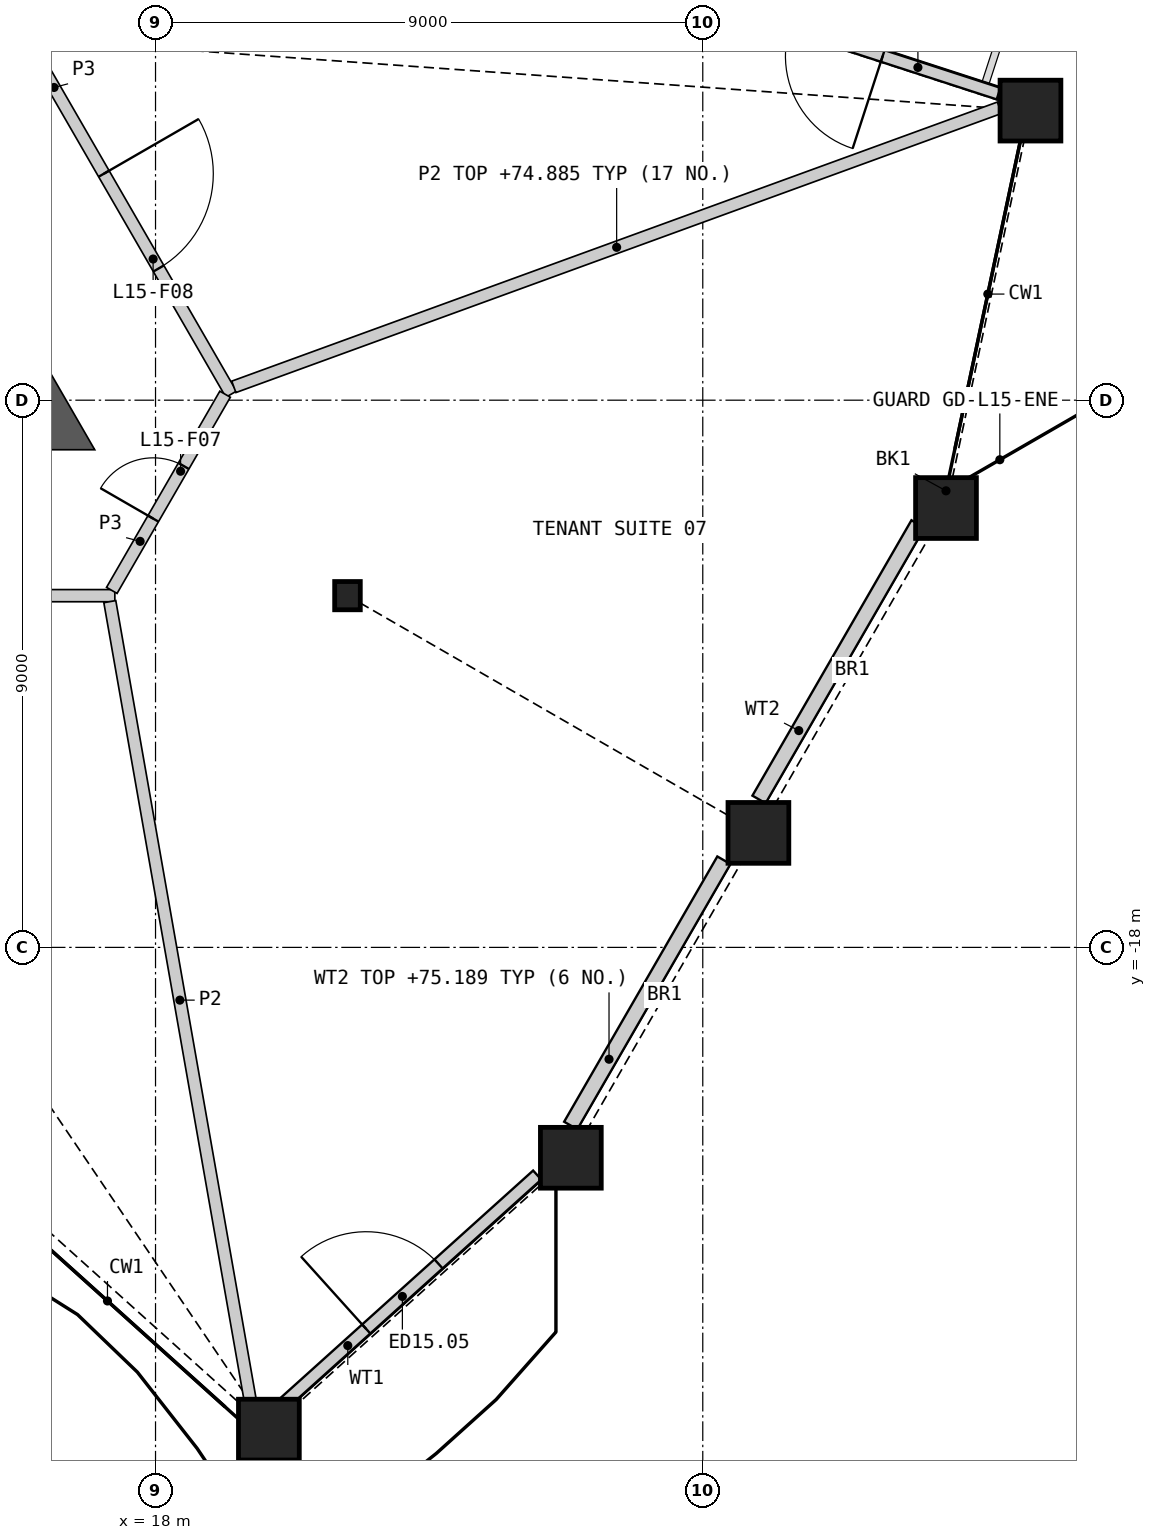
"""IFC4 building model, lengths in metres.
Left out: names, types, materials, properties, quantities, classifications, styles, units other than length and angle.
Written with IfcOpenShell. Run it as: python <this file> out.ifc"""

import sys

from ifc_helpers import new_model, si_unit, direction, frame, frame_2d, origin, origin_2d, place, context, subcontext, project, spatial, polyline, rectangle, hollow_rectangle, i_section, outline, extrude, element, fill, save


model = new_model("IFC4")
c1 = context("Model", 3, precision=1e-05, world=origin(), true_north=direction((0.0, 1.0)))
c2 = subcontext(c1, "Body", "Model", "MODEL_VIEW")
j1 = project(units=[si_unit("LENGTHUNIT", "METRE"), si_unit("PLANEANGLEUNIT", "RADIAN")], contexts=[c1])
p1 = place(None, origin())
s1 = spatial("IfcSite", under=j1, at=p1, CompositionType="ELEMENT")
p2 = place(p1, origin())
s2 = spatial("IfcBuilding", under=s1, at=p2, CompositionType="ELEMENT")
p3 = place(p2, frame((0.0, 0.0, 72.0)))
s3 = spatial("IfcBuildingStorey", under=s2, at=p3, CompositionType="ELEMENT", Elevation=72.0)
for number, where, z_axis, x_axis in (
    (1, (19.864, -25.931, 0.0), (0.0, 0.0, 1.0), (1.0, 0.0, 0.0)),
    (2, (24.83, -21.46, 0.0), (0.0, 0.0, 1.0), (1.0, 0.0, 0.0)),
    (3, (27.915, -16.117, 0.0), (0.0, 0.0, 1.0), (1.0, 0.0, 0.0)),
    (4, (31.0, -10.774, 0.0), (0.0, 0.0, 1.0), (1.0, 0.0, 0.0)),
    (5, (32.389, -4.237, 0.0), (0.0, 0.0, 1.0), (1.0, 0.0, 0.0)),
):
    element("IfcColumn", number, at=place(p3, frame(where, z_axis=z_axis, x_axis=x_axis)), inside=s3, PredefinedType="COLUMN", context=c2, shape_type="SweptSolid", body=[
        extrude(hollow_rectangle(XDim=1.0, YDim=1.0, WallThickness=0.07, at=origin_2d()), origin(), (0.0, 0.0, 1.0), 4.2),
    ])
p4 = place(p3, frame((21.157, -12.215, 0.0), z_axis=(0.0, 0.0, 1.0), x_axis=(1.0, 0.0, 0.0)))
e6 = element("IfcColumn", 6, at=p4, inside=s3, PredefinedType="COLUMN", context=c2, shape_type="SweptSolid", body=[
    extrude(i_section(OverallWidth=0.421, OverallDepth=0.465, WebThickness=0.045, FlangeThickness=0.072, at=origin_2d()), origin(), (0.0, 0.0, 1.0), 4.2),
])
p5 = place(p3, frame((20.124, -25.484, 0.0), z_axis=(0.0, 0.0, 1.0), x_axis=(0.74315945765, 0.669114355327, 0.0)))
e7 = element("IfcWall", 7, at=p5, inside=s3, PredefinedType="SOLIDWALL", context=c2, shape_type="SweptSolid", body=[
    extrude(rectangle(XDim=5.589, YDim=0.2, at=frame_2d((2.794, 0.0))), origin(), (0.0, 0.0, 1.0), 3.189),
])
p6 = place(p5, frame((1.805, 0.0, 0.0)))
e8 = element("IfcOpeningElement", 8, at=p6, cuts=e7, PredefinedType="OPENING", context=c2, shape_type="SweptSolid", body=[
    extrude(rectangle(XDim=1.6, YDim=2.4, at=frame_2d((0.8, 1.2))), frame((0.0, 0.11, 0.0), z_axis=(0.0, -1.0, 0.0), x_axis=(1.0, 0.0, 0.0)), (0.0, 0.0, 1.0), 0.22),
])
p7 = place(p3, frame((24.828, -20.93, 0.0), z_axis=(0.0, 0.0, 1.0), x_axis=(0.500021659459, 0.866012898329, 0.0)))
e9 = element("IfcWall", 9, at=p7, inside=s3, PredefinedType="SOLIDWALL", context=c2, shape_type="SweptSolid", body=[
    extrude(rectangle(XDim=5.038, YDim=0.25, at=frame_2d((2.519, 0.0))), origin(), (0.0, 0.0, 1.0), 3.189),
])
p8 = place(p3, frame((27.925, -15.567, 0.0), z_axis=(0.0, 0.0, 1.0), x_axis=(0.500009302692, 0.866020032806, 0.0)))
e10 = element("IfcWall", 10, at=p8, inside=s3, PredefinedType="SOLIDWALL", context=c2, shape_type="SweptSolid", body=[
    extrude(rectangle(XDim=5.231, YDim=0.25, at=frame_2d((2.615, 0.0))), origin(), (0.0, 0.0, 1.0), 3.189),
])
p9 = place(p3, frame((31.865, -3.958, 0.0), z_axis=(0.0, 0.0, 1.0), x_axis=(-0.951066864375, 0.308985144444, 0.0)))
e11 = element("IfcWall", 11, at=p9, inside=s3, PredefinedType="SOLIDWALL", context=c2, shape_type="SweptSolid", body=[
    extrude(rectangle(XDim=5.579, YDim=0.2, at=frame_2d((2.79, 0.0))), origin(), (0.0, 0.0, 1.0), 3.189),
])
p10 = place(p9, frame((2.003, 0.0, 0.0)))
e12 = element("IfcOpeningElement", 12, at=p10, cuts=e11, PredefinedType="OPENING", context=c2, shape_type="SweptSolid", body=[
    extrude(rectangle(XDim=1.6, YDim=2.4, at=frame_2d((0.8, 1.2))), frame((0.0, 0.11, 0.0), z_axis=(0.0, -1.0, 0.0), x_axis=(1.0, 0.0, 0.0)), (0.0, 0.0, 1.0), 0.22),
])
p11 = place(p3, origin())
e13 = element("IfcWall", 13, at=p11, inside=s3, PredefinedType="SHEAR", context=c2, shape_type="SweptSolid", body=[
    extrude(outline(polyline([(15.441, -9.815), (15.441, -8.915), (16.221, -8.465), (17.0, -9.815), (15.441, -9.815)])), origin(), (0.0, 0.0, 1.0), 3.8),
])
p12 = place(p3, frame((10.821, -12.215, 0.0), z_axis=(0.0, 0.0, 1.0), x_axis=(1.0, 0.0, 0.0)))
e14 = element("IfcWall", 14, at=p12, inside=s3, PredefinedType="PARTITIONING", context=c2, shape_type="SweptSolid", body=[
    extrude(rectangle(XDim=6.51, YDim=0.2, at=frame_2d((3.255, 0.0))), origin(), (0.0, 0.0, 1.0), 3.8),
])
p13 = place(p12, frame((2.655, 0.0, 0.0)))
e15 = element("IfcOpeningElement", 15, at=p13, cuts=e14, PredefinedType="OPENING", context=c2, shape_type="SweptSolid", body=[
    extrude(rectangle(XDim=1.0, YDim=2.1, at=frame_2d((0.5, 1.05))), frame((0.0, 0.11, 0.0), z_axis=(0.0, -1.0, 0.0), x_axis=(1.0, 0.0, 0.0)), (0.0, 0.0, 1.0), 0.22),
])
p14 = place(p3, frame((16.008, -3.296, 0.0), z_axis=(0.0, 0.0, 1.0), x_axis=(0.499984737558, -0.86603421538, 0.0)))
e16 = element("IfcWall", 16, at=p14, inside=s3, PredefinedType="PARTITIONING", context=c2, shape_type="SweptSolid", body=[
    extrude(rectangle(XDim=6.473, YDim=0.2, at=frame_2d((3.236, 0.0))), origin(), (0.0, 0.0, 1.0), 3.8),
])
p15 = place(p14, frame((2.285, 0.0, 0.0)))
e17 = element("IfcOpeningElement", 17, at=p15, cuts=e16, PredefinedType="OPENING", context=c2, shape_type="SweptSolid", body=[
    extrude(rectangle(XDim=1.8, YDim=2.1, at=frame_2d((0.9, 1.05))), frame((0.0, 0.11, 0.0), z_axis=(0.0, -1.0, 0.0), x_axis=(1.0, 0.0, 0.0)), (0.0, 0.0, 1.0), 0.22),
])
p16 = place(p3, frame((17.281, -12.128, 0.0), z_axis=(0.0, 0.0, 1.0), x_axis=(0.499958791762, 0.866049194065, 0.0)))
e18 = element("IfcWall", 18, at=p16, inside=s3, PredefinedType="PARTITIONING", context=c2, shape_type="SweptSolid", body=[
    extrude(rectangle(XDim=3.726, YDim=0.2, at=frame_2d((1.863, 0.0))), origin(), (0.0, 0.0, 1.0), 3.8),
])
p17 = place(p16, frame((1.363, 0.0, 0.0)))
e19 = element("IfcOpeningElement", 19, at=p17, cuts=e18, PredefinedType="OPENING", context=c2, shape_type="SweptSolid", body=[
    extrude(rectangle(XDim=1.0, YDim=2.1, at=frame_2d((0.5, 1.05))), frame((0.0, 0.11, 0.0), z_axis=(0.0, -1.0, 0.0), x_axis=(1.0, 0.0, 0.0)), (0.0, 0.0, 1.0), 0.22),
])
p18 = place(p3, frame((19.288, -8.781, 0.0), z_axis=(0.0, 0.0, 1.0), x_axis=(0.939515478087, 0.34250644729, 0.0)))
e20 = element("IfcWall", 20, at=p18, inside=s3, PredefinedType="PARTITIONING", context=c2, shape_type="SweptSolid", body=[
    extrude(rectangle(XDim=13.402, YDim=0.2, at=frame_2d((6.701, 0.0))), origin(), (0.0, 0.0, 1.0), 2.885),
])
p19 = place(p3, frame((17.248, -12.313, 0.0), z_axis=(0.0, 0.0, 1.0), x_axis=(0.173132292437, -0.984898578187, 0.0)))
e21 = element("IfcWall", 21, at=p19, inside=s3, PredefinedType="PARTITIONING", context=c2, shape_type="SweptSolid", body=[
    extrude(rectangle(XDim=13.309, YDim=0.2, at=frame_2d((6.654, 0.0))), origin(), (0.0, 0.0, 1.0), 2.885),
])
p20 = place(p6, origin())
e22 = element("IfcDoor", 22, at=p20, inside=s3, OperationType="DOUBLE_DOOR_SINGLE_SWING", PredefinedType="DOOR", context=c2, shape_type="SweptSolid", body=[
    extrude(rectangle(XDim=1.6, YDim=2.4, at=frame_2d((0.8, 1.2))), frame((0.0, 0.025, 0.0), z_axis=(0.0, -1.0, 0.0), x_axis=(1.0, 0.0, 0.0)), (0.0, 0.0, 1.0), 0.05),
])
fill(e8, e22)
p21 = place(p10, origin())
e23 = element("IfcDoor", 23, at=p21, inside=s3, OperationType="DOUBLE_DOOR_SINGLE_SWING", PredefinedType="DOOR", context=c2, shape_type="SweptSolid", body=[
    extrude(rectangle(XDim=1.6, YDim=2.4, at=frame_2d((0.8, 1.2))), frame((0.0, 0.025, 0.0), z_axis=(0.0, -1.0, 0.0), x_axis=(1.0, 0.0, 0.0)), (0.0, 0.0, 1.0), 0.05),
])
fill(e12, e23)
p22 = place(p17, origin())
e24 = element("IfcDoor", 24, at=p22, inside=s3, OperationType="SINGLE_SWING_LEFT", PredefinedType="DOOR", context=c2, shape_type="SweptSolid", body=[
    extrude(rectangle(XDim=1.0, YDim=2.1, at=frame_2d((0.5, 1.05))), frame((0.0, 0.025, 0.0), z_axis=(0.0, -1.0, 0.0), x_axis=(1.0, 0.0, 0.0)), (0.0, 0.0, 1.0), 0.05),
])
fill(e19, e24)
p23 = place(p15, origin())
e25 = element("IfcDoor", 25, at=p23, inside=s3, OperationType="DOUBLE_DOOR_SINGLE_SWING", PredefinedType="DOOR", context=c2, shape_type="SweptSolid", body=[
    extrude(rectangle(XDim=1.8, YDim=2.1, at=frame_2d((0.9, 1.05))), frame((0.0, 0.025, 0.0), z_axis=(0.0, -1.0, 0.0), x_axis=(1.0, 0.0, 0.0)), (0.0, 0.0, 1.0), 0.05),
])
fill(e17, e25)
save(model, sys.argv[1])
